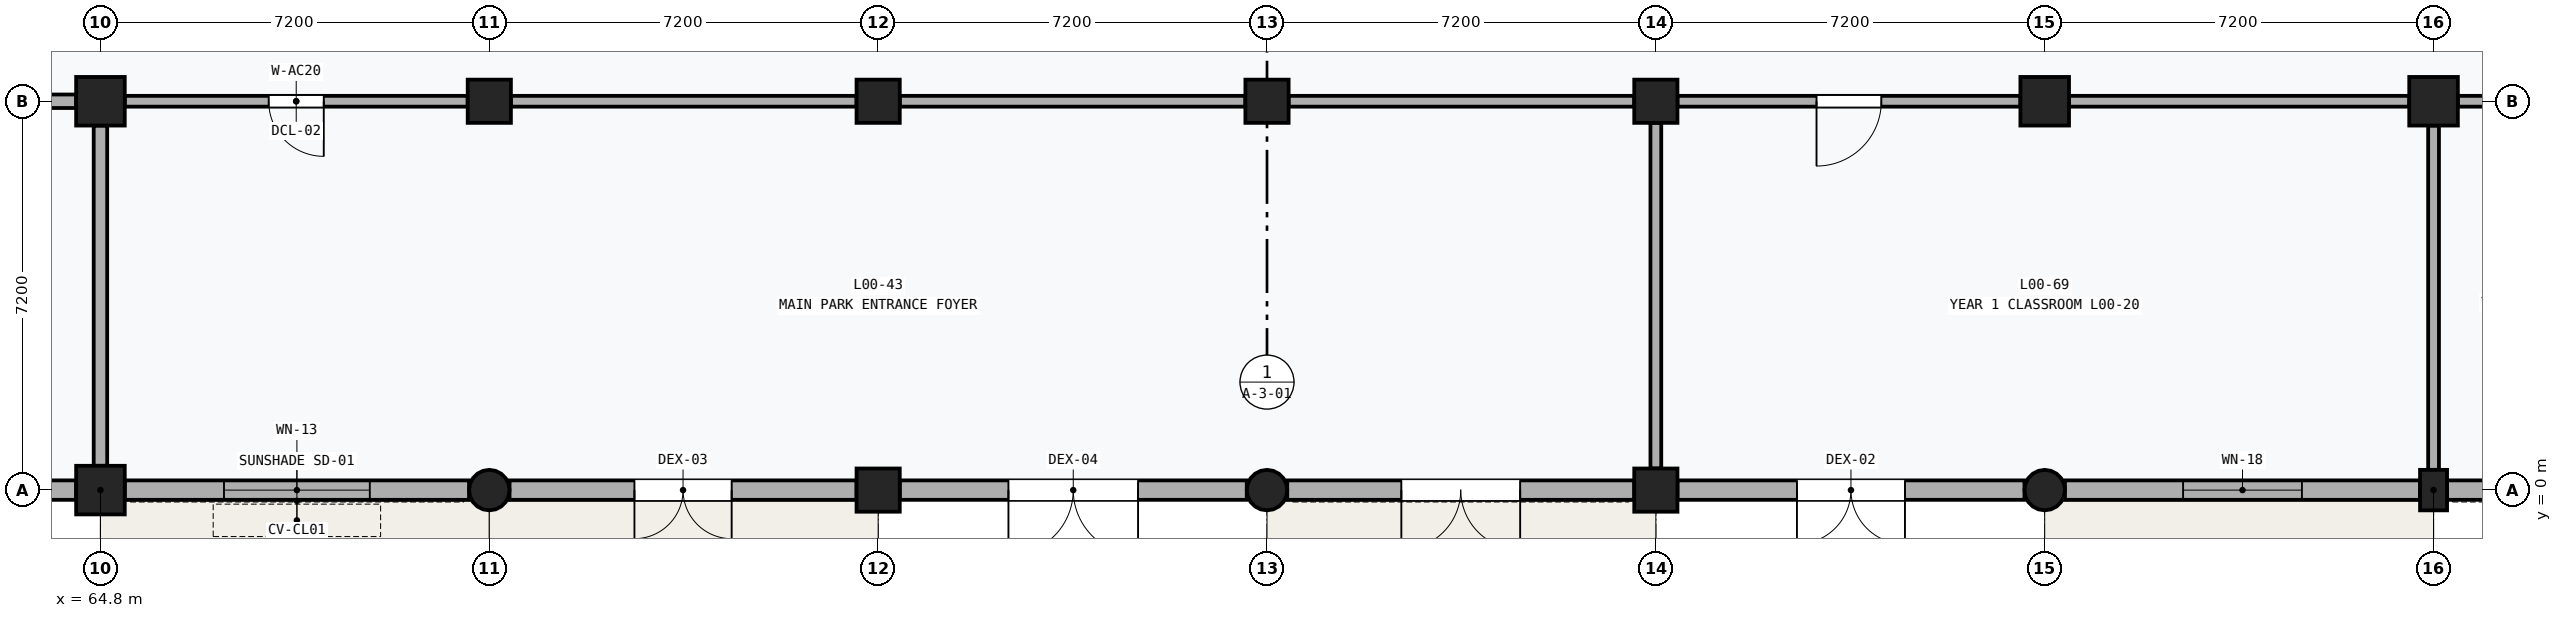
"""IFC4 building model, lengths in metres.
Left out: names, types, materials, properties, quantities, classifications, styles, units other than length and angle.
Written with IfcOpenShell. Run it as: python <this file> out.ifc"""

import sys

from ifc_helpers import new_model, si_unit, direction, frame, frame_2d, origin, origin_2d, place, context, subcontext, project, spatial, rectangle, circle, extrude, element, fill, save


model = new_model("IFC4")
c1 = context("Model", 3, precision=1e-05, world=origin(), true_north=direction((0.0, 1.0)))
c2 = subcontext(c1, "Body", "Model", "MODEL_VIEW")
j1 = project(units=[si_unit("LENGTHUNIT", "METRE"), si_unit("PLANEANGLEUNIT", "RADIAN")], contexts=[c1])
p1 = place(None, origin())
s1 = spatial("IfcSite", under=j1, at=p1, CompositionType="ELEMENT")
p2 = place(p1, origin())
s2 = spatial("IfcBuilding", under=s1, at=p2, CompositionType="ELEMENT")
p3 = place(p2, origin())
s3 = spatial("IfcBuildingStorey", under=s2, at=p3, CompositionType="ELEMENT", Elevation=0.0)
for number, where, z_axis, x_axis in (
    (1, (64.8, 0.0, 0.0), (0.0, 0.0, 1.0), (1.0, 0.0, 0.0)),
    (2, (64.8, 7.2, 0.0), (0.0, 0.0, 1.0), (1.0, 0.0, 0.0)),
):
    element("IfcColumn", number, at=place(p3, frame(where, z_axis=z_axis, x_axis=x_axis)), inside=s3, PredefinedType="COLUMN", context=c2, shape_type="SweptSolid", body=[
        extrude(rectangle(XDim=0.9, YDim=0.9, at=origin_2d()), origin(), (0.0, 0.0, 1.0), 4.8),
    ])
p4 = place(p3, frame((72.0, 0.0, 0.0), z_axis=(0.0, 0.0, 1.0), x_axis=(1.0, 0.0, 0.0)))
e3 = element("IfcColumn", 3, at=p4, inside=s3, PredefinedType="COLUMN", context=c2, shape_type="SweptSolid", body=[
    extrude(circle(Radius=0.375, at=origin_2d()), origin(), (0.0, 0.0, 1.0), 4.8),
])
for number, where, z_axis, x_axis in (
    (4, (72.0, 7.2, 0.0), (0.0, 0.0, 1.0), (1.0, 0.0, 0.0)),
    (5, (79.2, 0.0, 0.0), (0.0, 0.0, 1.0), (1.0, 0.0, 0.0)),
    (6, (79.2, 7.2, 0.0), (0.0, 0.0, 1.0), (1.0, 0.0, 0.0)),
):
    element("IfcColumn", number, at=place(p3, frame(where, z_axis=z_axis, x_axis=x_axis)), inside=s3, PredefinedType="COLUMN", context=c2, shape_type="SweptSolid", body=[
        extrude(rectangle(XDim=0.8, YDim=0.8, at=origin_2d()), origin(), (0.0, 0.0, 1.0), 4.8),
    ])
p5 = place(p3, frame((86.4, 0.0, 0.0), z_axis=(0.0, 0.0, 1.0), x_axis=(1.0, 0.0, 0.0)))
e7 = element("IfcColumn", 7, at=p5, inside=s3, PredefinedType="COLUMN", context=c2, shape_type="SweptSolid", body=[
    extrude(circle(Radius=0.375, at=origin_2d()), origin(), (0.0, 0.0, 1.0), 4.8),
])
for number, where, z_axis, x_axis in (
    (8, (86.4, 7.2, 0.0), (0.0, 0.0, 1.0), (1.0, 0.0, 0.0)),
    (9, (93.6, 0.0, 0.0), (0.0, 0.0, 1.0), (1.0, 0.0, 0.0)),
    (10, (93.6, 7.2, 0.0), (0.0, 0.0, 1.0), (1.0, 0.0, 0.0)),
):
    element("IfcColumn", number, at=place(p3, frame(where, z_axis=z_axis, x_axis=x_axis)), inside=s3, PredefinedType="COLUMN", context=c2, shape_type="SweptSolid", body=[
        extrude(rectangle(XDim=0.8, YDim=0.8, at=origin_2d()), origin(), (0.0, 0.0, 1.0), 4.8),
    ])
p6 = place(p3, frame((100.8, 0.0, 0.0), z_axis=(0.0, 0.0, 1.0), x_axis=(1.0, 0.0, 0.0)))
e11 = element("IfcColumn", 11, at=p6, inside=s3, PredefinedType="COLUMN", context=c2, shape_type="SweptSolid", body=[
    extrude(circle(Radius=0.375, at=origin_2d()), origin(), (0.0, 0.0, 1.0), 4.8),
])
p7 = place(p3, frame((100.8, 7.2, 0.0), z_axis=(0.0, 0.0, 1.0), x_axis=(1.0, 0.0, 0.0)))
e12 = element("IfcColumn", 12, at=p7, inside=s3, PredefinedType="COLUMN", context=c2, shape_type="SweptSolid", body=[
    extrude(rectangle(XDim=0.9, YDim=0.9, at=origin_2d()), origin(), (0.0, 0.0, 1.0), 4.8),
])
p8 = place(p3, frame((108.0, 0.0, 0.0), z_axis=(0.0, 0.0, 1.0), x_axis=(1.0, 0.0, 0.0)))
e13 = element("IfcColumn", 13, at=p8, inside=s3, PredefinedType="PILASTER", context=c2, shape_type="SweptSolid", body=[
    extrude(rectangle(XDim=0.5, YDim=0.75, at=origin_2d()), origin(), (0.0, 0.0, 1.0), 4.8),
])
p9 = place(p3, frame((108.0, 7.2, 0.0), z_axis=(0.0, 0.0, 1.0), x_axis=(1.0, 0.0, 0.0)))
e14 = element("IfcColumn", 14, at=p9, inside=s3, PredefinedType="COLUMN", context=c2, shape_type="SweptSolid", body=[
    extrude(rectangle(XDim=0.9, YDim=0.9, at=origin_2d()), origin(), (0.0, 0.0, 1.0), 4.8),
])
p10 = place(p3, frame((57.975, 0.0, 0.0), z_axis=(0.0, 0.0, 1.0), x_axis=(1.0, 0.0, 0.0)))
e15 = element("IfcWall", 15, at=p10, inside=s3, PredefinedType="SOLIDWALL", context=c2, shape_type="SweptSolid", body=[
    extrude(rectangle(XDim=6.375, YDim=0.36, at=frame_2d((3.188, 0.0))), origin(), (0.0, 0.0, 1.0), 3.89),
])
p11 = place(p10, frame((2.087, 0.0, 0.0)))
e16 = element("IfcOpeningElement", 16, at=p11, cuts=e15, PredefinedType="OPENING", context=c2, shape_type="SweptSolid", body=[
    extrude(rectangle(XDim=2.2, YDim=2.4, at=frame_2d((1.1, 1.2))), frame((0.0, 0.192, 0.0), z_axis=(0.0, -1.0, 0.0), x_axis=(1.0, 0.0, 0.0)), (0.0, 0.0, 1.0), 0.384),
])
p12 = place(p3, frame((65.25, 0.0, 0.0), z_axis=(0.0, 0.0, 1.0), x_axis=(1.0, 0.0, 0.0)))
e17 = element("IfcWall", 17, at=p12, inside=s3, PredefinedType="SOLIDWALL", context=c2, shape_type="SweptSolid", body=[
    extrude(rectangle(XDim=6.375, YDim=0.36, at=frame_2d((3.188, 0.0))), origin(), (0.0, 0.0, 1.0), 3.89),
])
p13 = place(p12, frame((1.837, 0.0, 0.85)))
e18 = element("IfcOpeningElement", 18, at=p13, cuts=e17, PredefinedType="OPENING", context=c2, shape_type="SweptSolid", body=[
    extrude(rectangle(XDim=2.7, YDim=2.0, at=frame_2d((1.35, 1.0))), frame((0.0, 0.192, 0.0), z_axis=(0.0, -1.0, 0.0), x_axis=(1.0, 0.0, 0.0)), (0.0, 0.0, 1.0), 0.384),
])
p14 = place(p3, frame((72.375, 0.0, 0.0), z_axis=(0.0, 0.0, 1.0), x_axis=(1.0, 0.0, 0.0)))
e19 = element("IfcWall", 19, at=p14, inside=s3, PredefinedType="SOLIDWALL", context=c2, shape_type="SweptSolid", body=[
    extrude(rectangle(XDim=6.425, YDim=0.36, at=frame_2d((3.212, 0.0))), origin(), (0.0, 0.0, 1.0), 3.89),
])
p15 = place(p14, frame((2.312, 0.0, 0.0)))
e20 = element("IfcOpeningElement", 20, at=p15, cuts=e19, PredefinedType="OPENING", context=c2, shape_type="SweptSolid", body=[
    extrude(rectangle(XDim=1.8, YDim=2.35, at=frame_2d((0.9, 1.175))), frame((0.0, 0.192, 0.0), z_axis=(0.0, -1.0, 0.0), x_axis=(1.0, 0.0, 0.0)), (0.0, 0.0, 1.0), 0.384),
])
p16 = place(p3, frame((79.6, 0.0, 0.0), z_axis=(0.0, 0.0, 1.0), x_axis=(1.0, 0.0, 0.0)))
e21 = element("IfcWall", 21, at=p16, inside=s3, PredefinedType="SOLIDWALL", context=c2, shape_type="SweptSolid", body=[
    extrude(rectangle(XDim=6.425, YDim=0.36, at=frame_2d((3.212, 0.0))), origin(), (0.0, 0.0, 1.0), 3.89),
])
p17 = place(p16, frame((2.012, 0.0, 0.0)))
e22 = element("IfcOpeningElement", 22, at=p17, cuts=e21, PredefinedType="OPENING", context=c2, shape_type="SweptSolid", body=[
    extrude(rectangle(XDim=2.4, YDim=2.45, at=frame_2d((1.2, 1.225))), frame((0.0, 0.192, 0.0), z_axis=(0.0, -1.0, 0.0), x_axis=(1.0, 0.0, 0.0)), (0.0, 0.0, 1.0), 0.384),
])
p18 = place(p3, frame((86.775, 0.0, 0.0), z_axis=(0.0, 0.0, 1.0), x_axis=(1.0, 0.0, 0.0)))
e23 = element("IfcWall", 23, at=p18, inside=s3, PredefinedType="SOLIDWALL", context=c2, shape_type="SweptSolid", body=[
    extrude(rectangle(XDim=6.425, YDim=0.36, at=frame_2d((3.212, 0.0))), origin(), (0.0, 0.0, 1.0), 3.89),
])
p19 = place(p18, frame((2.113, 0.0, 0.0)))
e24 = element("IfcOpeningElement", 24, at=p19, cuts=e23, PredefinedType="OPENING", context=c2, shape_type="SweptSolid", body=[
    extrude(rectangle(XDim=2.2, YDim=2.4, at=frame_2d((1.1, 1.2))), frame((0.0, 0.192, 0.0), z_axis=(0.0, -1.0, 0.0), x_axis=(1.0, 0.0, 0.0)), (0.0, 0.0, 1.0), 0.384),
])
p20 = place(p3, frame((94.0, 0.0, 0.0), z_axis=(0.0, 0.0, 1.0), x_axis=(1.0, 0.0, 0.0)))
e25 = element("IfcWall", 25, at=p20, inside=s3, PredefinedType="SOLIDWALL", context=c2, shape_type="SweptSolid", body=[
    extrude(rectangle(XDim=6.425, YDim=0.36, at=frame_2d((3.212, 0.0))), origin(), (0.0, 0.0, 1.0), 3.89),
])
p21 = place(p20, frame((2.212, 0.0, 0.0)))
e26 = element("IfcOpeningElement", 26, at=p21, cuts=e25, PredefinedType="OPENING", context=c2, shape_type="SweptSolid", body=[
    extrude(rectangle(XDim=2.0, YDim=2.4, at=frame_2d((1.0, 1.2))), frame((0.0, 0.192, 0.0), z_axis=(0.0, -1.0, 0.0), x_axis=(1.0, 0.0, 0.0)), (0.0, 0.0, 1.0), 0.384),
])
p22 = place(p3, frame((101.175, 0.0, 0.0), z_axis=(0.0, 0.0, 1.0), x_axis=(1.0, 0.0, 0.0)))
e27 = element("IfcWall", 27, at=p22, inside=s3, PredefinedType="SOLIDWALL", context=c2, shape_type="SweptSolid", body=[
    extrude(rectangle(XDim=6.575, YDim=0.36, at=frame_2d((3.288, 0.0))), origin(), (0.0, 0.0, 1.0), 3.89),
])
p23 = place(p22, frame((2.188, 0.0, 1.1)))
e28 = element("IfcOpeningElement", 28, at=p23, cuts=e27, PredefinedType="OPENING", context=c2, shape_type="SweptSolid", body=[
    extrude(rectangle(XDim=2.2, YDim=1.5, at=frame_2d((1.1, 0.75))), frame((0.0, 0.192, 0.0), z_axis=(0.0, -1.0, 0.0), x_axis=(1.0, 0.0, 0.0)), (0.0, 0.0, 1.0), 0.384),
])
p24 = place(p3, frame((108.25, 0.0, 0.0), z_axis=(0.0, 0.0, 1.0), x_axis=(1.0, 0.0, 0.0)))
e29 = element("IfcWall", 29, at=p24, inside=s3, PredefinedType="SOLIDWALL", context=c2, shape_type="SweptSolid", body=[
    extrude(rectangle(XDim=6.575, YDim=0.36, at=frame_2d((3.288, 0.0))), origin(), (0.0, 0.0, 1.0), 3.89),
])
p25 = place(p24, frame((2.087, 0.0, 0.0)))
e30 = element("IfcOpeningElement", 30, at=p25, cuts=e29, PredefinedType="OPENING", context=c2, shape_type="SweptSolid", body=[
    extrude(rectangle(XDim=2.4, YDim=2.45, at=frame_2d((1.2, 1.225))), frame((0.0, 0.192, 0.0), z_axis=(0.0, -1.0, 0.0), x_axis=(1.0, 0.0, 0.0)), (0.0, 0.0, 1.0), 0.384),
])
p26 = place(p3, frame((58.0, 7.2, 0.0), z_axis=(0.0, 0.0, 1.0), x_axis=(1.0, 0.0, 0.0)))
e31 = element("IfcWall", 31, at=p26, inside=s3, PredefinedType="PARTITIONING", context=c2, shape_type="SweptSolid", body=[
    extrude(rectangle(XDim=6.35, YDim=0.25, at=frame_2d((3.175, 0.0))), origin(), (0.0, 0.0, 1.0), 3.62),
])
p27 = place(p26, frame((2.675, 0.0, 0.0)))
e32 = element("IfcOpeningElement", 32, at=p27, cuts=e31, PredefinedType="OPENING", context=c2, shape_type="SweptSolid", body=[
    extrude(rectangle(XDim=1.0, YDim=2.1, at=frame_2d((0.5, 1.05))), frame((0.0, 0.137, 0.0), z_axis=(0.0, -1.0, 0.0), x_axis=(1.0, 0.0, 0.0)), (0.0, 0.0, 1.0), 0.274),
])
p28 = place(p3, frame((64.8, 0.45, 0.0), z_axis=(0.0, 0.0, 1.0), x_axis=(0.0, 1.0, 0.0)))
e33 = element("IfcWall", 33, at=p28, inside=s3, PredefinedType="PARTITIONING", context=c2, shape_type="SweptSolid", body=[
    extrude(rectangle(XDim=6.3, YDim=0.25, at=frame_2d((3.15, 0.0))), origin(), (0.0, 0.0, 1.0), 3.62),
])
p29 = place(p3, frame((65.25, 7.2, 0.0), z_axis=(0.0, 0.0, 1.0), x_axis=(1.0, 0.0, 0.0)))
e34 = element("IfcWall", 34, at=p29, inside=s3, PredefinedType="PARTITIONING", context=c2, shape_type="SweptSolid", body=[
    extrude(rectangle(XDim=6.35, YDim=0.2, at=frame_2d((3.175, 0.0))), origin(), (0.0, 0.0, 1.0), 3.62),
])
p30 = place(p29, frame((2.665, 0.0, 0.0)))
e35 = element("IfcOpeningElement", 35, at=p30, cuts=e34, PredefinedType="OPENING", context=c2, shape_type="SweptSolid", body=[
    extrude(rectangle(XDim=1.02, YDim=2.12, at=frame_2d((0.51, 1.06))), frame((0.0, 0.112, 0.0), z_axis=(0.0, -1.0, 0.0), x_axis=(1.0, 0.0, 0.0)), (0.0, 0.0, 1.0), 0.224),
])
p31 = place(p3, frame((72.4, 7.2, 0.0), z_axis=(0.0, 0.0, 1.0), x_axis=(1.0, 0.0, 0.0)))
e36 = element("IfcWall", 36, at=p31, inside=s3, PredefinedType="PARTITIONING", context=c2, shape_type="SweptSolid", body=[
    extrude(rectangle(XDim=6.4, YDim=0.2, at=frame_2d((3.2, 0.0))), origin(), (0.0, 0.0, 1.0), 3.62),
])
for number, where, z_axis, x_axis in (
    (37, (79.6, 7.2, 0.0), (0.0, 0.0, 1.0), (1.0, 0.0, 0.0)),
    (38, (86.8, 7.2, 0.0), (0.0, 0.0, 1.0), (1.0, 0.0, 0.0)),
):
    element("IfcWall", number, at=place(p3, frame(where, z_axis=z_axis, x_axis=x_axis)), inside=s3, PredefinedType="PARTITIONING", context=c2, shape_type="SweptSolid", body=[
        extrude(rectangle(XDim=6.4, YDim=0.2, at=frame_2d((3.2, 0.0))), origin(), (0.0, 0.0, 1.0), 3.62),
    ])
p32 = place(p3, frame((93.6, 0.4, 0.0), z_axis=(0.0, 0.0, 1.0), x_axis=(0.0, 1.0, 0.0)))
e39 = element("IfcWall", 39, at=p32, inside=s3, PredefinedType="PARTITIONING", context=c2, shape_type="SweptSolid", body=[
    extrude(rectangle(XDim=6.4, YDim=0.2, at=frame_2d((3.2, 0.0))), origin(), (0.0, 0.0, 1.0), 3.62),
])
p33 = place(p3, frame((94.0, 7.2, 0.0), z_axis=(0.0, 0.0, 1.0), x_axis=(1.0, 0.0, 0.0)))
e40 = element("IfcWall", 40, at=p33, inside=s3, PredefinedType="PARTITIONING", context=c2, shape_type="SweptSolid", body=[
    extrude(rectangle(XDim=6.35, YDim=0.2, at=frame_2d((3.175, 0.0))), origin(), (0.0, 0.0, 1.0), 3.62),
])
p34 = place(p33, frame((2.575, 0.0, 0.0)))
e41 = element("IfcOpeningElement", 41, at=p34, cuts=e40, PredefinedType="OPENING", context=c2, shape_type="SweptSolid", body=[
    extrude(rectangle(XDim=1.2, YDim=2.24, at=frame_2d((0.6, 1.12))), frame((0.0, 0.112, 0.0), z_axis=(0.0, -1.0, 0.0), x_axis=(1.0, 0.0, 0.0)), (0.0, 0.0, 1.0), 0.224),
])
p35 = place(p3, frame((101.25, 7.2, 0.0), z_axis=(0.0, 0.0, 1.0), x_axis=(1.0, 0.0, 0.0)))
e42 = element("IfcWall", 42, at=p35, inside=s3, PredefinedType="PARTITIONING", context=c2, shape_type="SweptSolid", body=[
    extrude(rectangle(XDim=6.3, YDim=0.2, at=frame_2d((3.15, 0.0))), origin(), (0.0, 0.0, 1.0), 3.62),
])
p36 = place(p3, frame((108.0, 0.375, 0.0), z_axis=(0.0, 0.0, 1.0), x_axis=(0.0, 1.0, 0.0)))
e43 = element("IfcWall", 43, at=p36, inside=s3, PredefinedType="PARTITIONING", context=c2, shape_type="SweptSolid", body=[
    extrude(rectangle(XDim=6.375, YDim=0.2, at=frame_2d((3.188, 0.0))), origin(), (0.0, 0.0, 1.0), 3.62),
])
p37 = place(p3, frame((108.45, 7.2, 0.0), z_axis=(0.0, 0.0, 1.0), x_axis=(1.0, 0.0, 0.0)))
e44 = element("IfcWall", 44, at=p37, inside=s3, PredefinedType="PARTITIONING", context=c2, shape_type="SweptSolid", body=[
    extrude(rectangle(XDim=6.35, YDim=0.2, at=frame_2d((3.175, 0.0))), origin(), (0.0, 0.0, 1.0), 3.62),
])
p38 = place(p37, frame((2.675, 0.0, 0.0)))
e45 = element("IfcOpeningElement", 45, at=p38, cuts=e44, PredefinedType="OPENING", context=c2, shape_type="SweptSolid", body=[
    extrude(rectangle(XDim=1.0, YDim=2.1, at=frame_2d((0.5, 1.05))), frame((0.0, 0.112, 0.0), z_axis=(0.0, -1.0, 0.0), x_axis=(1.0, 0.0, 0.0)), (0.0, 0.0, 1.0), 0.224),
])
p39 = place(p13, origin())
e46 = element("IfcWindow", 46, at=p39, inside=s3, PartitioningType="SINGLE_PANEL", PredefinedType="WINDOW", context=c2, shape_type="SweptSolid", body=[
    extrude(rectangle(XDim=2.7, YDim=2.0, at=frame_2d((1.35, 1.0))), frame((0.0, 0.03, 0.0), z_axis=(0.0, -1.0, 0.0), x_axis=(1.0, 0.0, 0.0)), (0.0, 0.0, 1.0), 0.06),
])
fill(e18, e46)
p40 = place(p15, frame((1.8, 0.0, 0.0), z_axis=(0.0, 0.0, 1.0), x_axis=(-1.0, 0.0, 0.0)))
e47 = element("IfcDoor", 47, at=p40, inside=s3, OperationType="DOUBLE_DOOR_SINGLE_SWING", PredefinedType="DOOR", context=c2, shape_type="SweptSolid", body=[
    extrude(rectangle(XDim=1.8, YDim=2.35, at=frame_2d((0.9, 1.175))), frame((0.0, 0.025, 0.0), z_axis=(0.0, -1.0, 0.0), x_axis=(1.0, 0.0, 0.0)), (0.0, 0.0, 1.0), 0.05),
])
fill(e20, e47)
p41 = place(p17, frame((2.4, 0.0, 0.0), z_axis=(0.0, 0.0, 1.0), x_axis=(-1.0, 0.0, 0.0)))
e48 = element("IfcDoor", 48, at=p41, inside=s3, OperationType="DOUBLE_DOOR_SINGLE_SWING", PredefinedType="DOOR", context=c2, shape_type="SweptSolid", body=[
    extrude(rectangle(XDim=2.4, YDim=2.45, at=frame_2d((1.2, 1.225))), frame((0.0, 0.025, 0.0), z_axis=(0.0, -1.0, 0.0), x_axis=(1.0, 0.0, 0.0)), (0.0, 0.0, 1.0), 0.05),
])
fill(e22, e48)
p42 = place(p19, frame((2.2, 0.0, 0.0), z_axis=(0.0, 0.0, 1.0), x_axis=(-1.0, 0.0, 0.0)))
e49 = element("IfcDoor", 49, at=p42, inside=s3, OperationType="DOUBLE_DOOR_SINGLE_SWING", PredefinedType="DOOR", context=c2, shape_type="SweptSolid", body=[
    extrude(rectangle(XDim=2.2, YDim=2.4, at=frame_2d((1.1, 1.2))), frame((0.0, 0.025, 0.0), z_axis=(0.0, -1.0, 0.0), x_axis=(1.0, 0.0, 0.0)), (0.0, 0.0, 1.0), 0.05),
])
fill(e24, e49)
p43 = place(p21, frame((2.0, 0.0, 0.0), z_axis=(0.0, 0.0, 1.0), x_axis=(-1.0, 0.0, 0.0)))
e50 = element("IfcDoor", 50, at=p43, inside=s3, OperationType="DOUBLE_DOOR_SINGLE_SWING", PredefinedType="DOOR", context=c2, shape_type="SweptSolid", body=[
    extrude(rectangle(XDim=2.0, YDim=2.4, at=frame_2d((1.0, 1.2))), frame((0.0, 0.025, 0.0), z_axis=(0.0, -1.0, 0.0), x_axis=(1.0, 0.0, 0.0)), (0.0, 0.0, 1.0), 0.05),
])
fill(e26, e50)
p44 = place(p23, origin())
e51 = element("IfcWindow", 51, at=p44, inside=s3, PartitioningType="SINGLE_PANEL", PredefinedType="WINDOW", context=c2, shape_type="SweptSolid", body=[
    extrude(rectangle(XDim=2.2, YDim=1.5, at=frame_2d((1.1, 0.75))), frame((0.0, 0.03, 0.0), z_axis=(0.0, -1.0, 0.0), x_axis=(1.0, 0.0, 0.0)), (0.0, 0.0, 1.0), 0.06),
])
fill(e28, e51)
p45 = place(p30, frame((1.02, 0.0, 0.0), z_axis=(0.0, 0.0, 1.0), x_axis=(-1.0, 0.0, 0.0)))
e52 = element("IfcDoor", 52, at=p45, inside=s3, OperationType="SINGLE_SWING_LEFT", PredefinedType="DOOR", context=c2, shape_type="SweptSolid", body=[
    extrude(rectangle(XDim=1.02, YDim=2.12, at=frame_2d((0.51, 1.06))), frame((0.0, 0.025, 0.0), z_axis=(0.0, -1.0, 0.0), x_axis=(1.0, 0.0, 0.0)), (0.0, 0.0, 1.0), 0.05),
])
fill(e35, e52)
p46 = place(p34, frame((1.2, 0.0, 0.0), z_axis=(0.0, 0.0, 1.0), x_axis=(-1.0, 0.0, 0.0)))
e53 = element("IfcDoor", 53, at=p46, inside=s3, OperationType="SINGLE_SWING_RIGHT", PredefinedType="DOOR", context=c2, shape_type="SweptSolid", body=[
    extrude(rectangle(XDim=1.2, YDim=2.24, at=frame_2d((0.6, 1.12))), frame((0.0, 0.025, 0.0), z_axis=(0.0, -1.0, 0.0), x_axis=(1.0, 0.0, 0.0)), (0.0, 0.0, 1.0), 0.05),
])
fill(e41, e53)
save(model, sys.argv[1])
